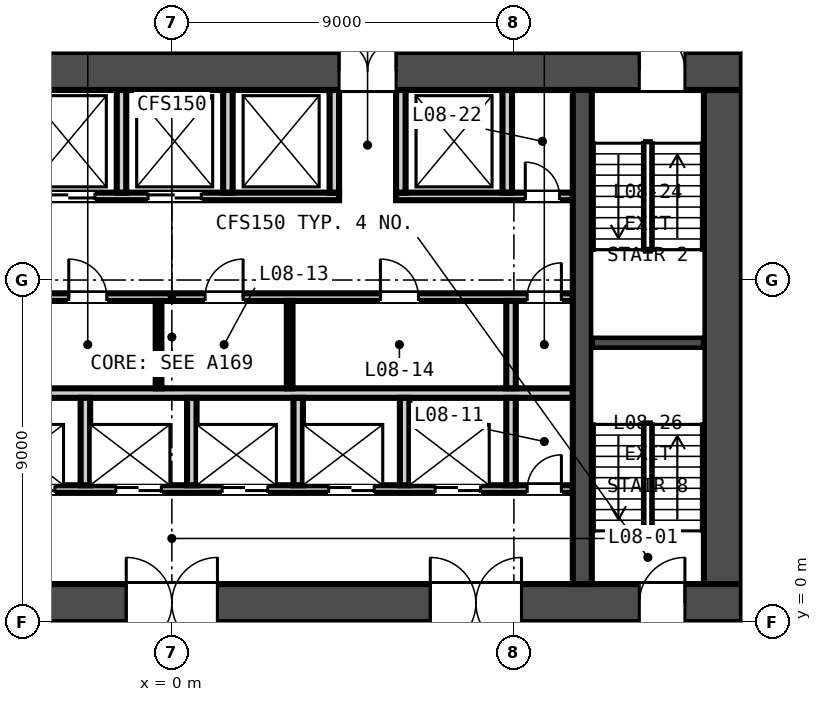
"""IFC4 building model, lengths in metres.
Left out: names, types, materials, properties, quantities, classifications, styles, units other than length and angle.
Written with IfcOpenShell. Run it as: python <this file> out.ifc"""

import sys

from ifc_helpers import new_model, si_unit, direction, frame, frame_2d, origin, place, context, subcontext, project, spatial, rectangle, extrude, element, fill, save


model = new_model("IFC4")
c1 = context("Model", 3, precision=1e-05, world=origin(), true_north=direction((0.0, 1.0)))
c2 = subcontext(c1, "Body", "Model", "MODEL_VIEW")
j1 = project(units=[si_unit("LENGTHUNIT", "METRE"), si_unit("PLANEANGLEUNIT", "RADIAN")], contexts=[c1])
p1 = place(None, origin())
s1 = spatial("IfcSite", under=j1, at=p1, CompositionType="ELEMENT")
p2 = place(p1, origin())
s2 = spatial("IfcBuilding", under=s1, at=p2, CompositionType="ELEMENT")
p3 = place(p2, frame((0.0, 0.0, 43.3)))
s3 = spatial("IfcBuildingStorey", under=s2, at=p3, CompositionType="ELEMENT", Elevation=43.3)
p4 = place(p3, frame((-15.0, 0.5, -0.15), z_axis=(0.0, 0.0, 1.0), x_axis=(1.0, 0.0, 0.0)))
e1 = element("IfcWall", 1, at=p4, inside=s3, PredefinedType="SOLIDWALL", context=c2, shape_type="SweptSolid", body=[
    extrude(rectangle(XDim=30.0, YDim=1.0, at=frame_2d((15.0, 0.0))), origin(), (0.0, 0.0, 1.0), 3.65),
])
p5 = place(p4, frame((5.8, 0.0, 0.15)))
e2 = element("IfcOpeningElement", 2, at=p5, cuts=e1, PredefinedType="OPENING", context=c2, shape_type="SweptSolid", body=[
    extrude(rectangle(XDim=2.4, YDim=2.4, at=frame_2d((1.2, 1.2))), frame((0.0, 0.51, 0.0), z_axis=(0.0, -1.0, 0.0), x_axis=(1.0, 0.0, 0.0)), (0.0, 0.0, 1.0), 1.02),
])
p6 = place(p4, frame((13.8, 0.0, 0.15)))
e3 = element("IfcOpeningElement", 3, at=p6, cuts=e1, PredefinedType="OPENING", context=c2, shape_type="SweptSolid", body=[
    extrude(rectangle(XDim=2.4, YDim=2.4, at=frame_2d((1.2, 1.2))), frame((0.0, 0.51, 0.0), z_axis=(0.0, -1.0, 0.0), x_axis=(1.0, 0.0, 0.0)), (0.0, 0.0, 1.0), 1.02),
])
p7 = place(p4, frame((21.8, 0.0, 0.15)))
e4 = element("IfcOpeningElement", 4, at=p7, cuts=e1, PredefinedType="OPENING", context=c2, shape_type="SweptSolid", body=[
    extrude(rectangle(XDim=2.4, YDim=2.4, at=frame_2d((1.2, 1.2))), frame((0.0, 0.51, 0.0), z_axis=(0.0, -1.0, 0.0), x_axis=(1.0, 0.0, 0.0)), (0.0, 0.0, 1.0), 1.02),
])
p8 = place(p4, frame((1.5, 0.0, 0.15)))
e5 = element("IfcOpeningElement", 5, at=p8, cuts=e1, PredefinedType="OPENING", context=c2, shape_type="SweptSolid", body=[
    extrude(rectangle(XDim=1.2, YDim=2.1, at=frame_2d((0.6, 1.05))), frame((0.0, 0.51, 0.0), z_axis=(0.0, -1.0, 0.0), x_axis=(1.0, 0.0, 0.0)), (0.0, 0.0, 1.0), 1.02),
])
p9 = place(p4, frame((27.3, 0.0, 0.15)))
e6 = element("IfcOpeningElement", 6, at=p9, cuts=e1, PredefinedType="OPENING", context=c2, shape_type="SweptSolid", body=[
    extrude(rectangle(XDim=1.2, YDim=2.1, at=frame_2d((0.6, 1.05))), frame((0.0, 0.51, 0.0), z_axis=(0.0, -1.0, 0.0), x_axis=(1.0, 0.0, 0.0)), (0.0, 0.0, 1.0), 1.02),
])
p10 = place(p3, frame((-15.0, 14.5, -0.15), z_axis=(0.0, 0.0, 1.0), x_axis=(1.0, 0.0, 0.0)))
e7 = element("IfcWall", 7, at=p10, inside=s3, PredefinedType="SOLIDWALL", context=c2, shape_type="SweptSolid", body=[
    extrude(rectangle(XDim=30.0, YDim=1.0, at=frame_2d((15.0, 0.0))), origin(), (0.0, 0.0, 1.0), 3.65),
])
p11 = place(p10, frame((9.25, 0.0, 0.15)))
e8 = element("IfcOpeningElement", 8, at=p11, cuts=e7, PredefinedType="OPENING", context=c2, shape_type="SweptSolid", body=[
    extrude(rectangle(XDim=1.5, YDim=2.1, at=frame_2d((0.75, 1.05))), frame((0.0, 0.51, 0.0), z_axis=(0.0, -1.0, 0.0), x_axis=(1.0, 0.0, 0.0)), (0.0, 0.0, 1.0), 1.02),
])
p12 = place(p10, frame((19.4, 0.0, 0.15)))
e9 = element("IfcOpeningElement", 9, at=p12, cuts=e7, PredefinedType="OPENING", context=c2, shape_type="SweptSolid", body=[
    extrude(rectangle(XDim=1.5, YDim=2.1, at=frame_2d((0.75, 1.05))), frame((0.0, 0.51, 0.0), z_axis=(0.0, -1.0, 0.0), x_axis=(1.0, 0.0, 0.0)), (0.0, 0.0, 1.0), 1.02),
])
p13 = place(p10, frame((1.5, 0.0, 0.15)))
e10 = element("IfcOpeningElement", 10, at=p13, cuts=e7, PredefinedType="OPENING", context=c2, shape_type="SweptSolid", body=[
    extrude(rectangle(XDim=1.2, YDim=2.1, at=frame_2d((0.6, 1.05))), frame((0.0, 0.51, 0.0), z_axis=(0.0, -1.0, 0.0), x_axis=(1.0, 0.0, 0.0)), (0.0, 0.0, 1.0), 1.02),
])
p14 = place(p10, frame((27.3, 0.0, 0.15)))
e11 = element("IfcOpeningElement", 11, at=p14, cuts=e7, PredefinedType="OPENING", context=c2, shape_type="SweptSolid", body=[
    extrude(rectangle(XDim=1.2, YDim=2.1, at=frame_2d((0.6, 1.05))), frame((0.0, 0.51, 0.0), z_axis=(0.0, -1.0, 0.0), x_axis=(1.0, 0.0, 0.0)), (0.0, 0.0, 1.0), 1.02),
])
p15 = place(p3, frame((14.5, 1.0, -0.15), z_axis=(0.0, 0.0, 1.0), x_axis=(0.0, 1.0, 0.0)))
e12 = element("IfcWall", 12, at=p15, inside=s3, PredefinedType="SOLIDWALL", context=c2, shape_type="SweptSolid", body=[
    extrude(rectangle(XDim=13.0, YDim=1.0, at=frame_2d((6.5, 0.0))), origin(), (0.0, 0.0, 1.0), 3.65),
])
p16 = place(p3, frame((10.8, 1.0, -0.15), z_axis=(0.0, 0.0, 1.0), x_axis=(0.0, 1.0, 0.0)))
e13 = element("IfcWall", 13, at=p16, inside=s3, PredefinedType="SOLIDWALL", context=c2, shape_type="SweptSolid", body=[
    extrude(rectangle(XDim=13.0, YDim=0.5, at=frame_2d((6.5, 0.0))), origin(), (0.0, 0.0, 1.0), 3.65),
])
p17 = place(p3, frame((-10.55, 3.5, 0.0), z_axis=(0.0, 0.0, 1.0), x_axis=(1.0, 0.0, 0.0)))
e14 = element("IfcWall", 14, at=p17, inside=s3, PredefinedType="PARTITIONING", context=c2, shape_type="SweptSolid", body=[
    extrude(rectangle(XDim=21.1, YDim=0.2, at=frame_2d((10.55, 0.0))), origin(), (0.0, 0.0, 1.0), 3.5),
])
p18 = place(p17, frame((0.675, 0.0, 0.0)))
e15 = element("IfcOpeningElement", 15, at=p18, cuts=e14, PredefinedType="OPENING", context=c2, shape_type="SweptSolid", body=[
    extrude(rectangle(XDim=1.2, YDim=2.1, at=frame_2d((0.6, 1.05))), frame((0.0, 0.11, 0.0), z_axis=(0.0, -1.0, 0.0), x_axis=(1.0, 0.0, 0.0)), (0.0, 0.0, 1.0), 0.22),
])
p19 = place(p17, frame((3.475, 0.0, 0.0)))
e16 = element("IfcOpeningElement", 16, at=p19, cuts=e14, PredefinedType="OPENING", context=c2, shape_type="SweptSolid", body=[
    extrude(rectangle(XDim=1.2, YDim=2.1, at=frame_2d((0.6, 1.05))), frame((0.0, 0.11, 0.0), z_axis=(0.0, -1.0, 0.0), x_axis=(1.0, 0.0, 0.0)), (0.0, 0.0, 1.0), 0.22),
])
p20 = place(p17, frame((6.275, 0.0, 0.0)))
e17 = element("IfcOpeningElement", 17, at=p20, cuts=e14, PredefinedType="OPENING", context=c2, shape_type="SweptSolid", body=[
    extrude(rectangle(XDim=1.2, YDim=2.1, at=frame_2d((0.6, 1.05))), frame((0.0, 0.11, 0.0), z_axis=(0.0, -1.0, 0.0), x_axis=(1.0, 0.0, 0.0)), (0.0, 0.0, 1.0), 0.22),
])
p21 = place(p17, frame((9.075, 0.0, 0.0)))
e18 = element("IfcOpeningElement", 18, at=p21, cuts=e14, PredefinedType="OPENING", context=c2, shape_type="SweptSolid", body=[
    extrude(rectangle(XDim=1.2, YDim=2.1, at=frame_2d((0.6, 1.05))), frame((0.0, 0.11, 0.0), z_axis=(0.0, -1.0, 0.0), x_axis=(1.0, 0.0, 0.0)), (0.0, 0.0, 1.0), 0.22),
])
p22 = place(p17, frame((11.875, 0.0, 0.0)))
e19 = element("IfcOpeningElement", 19, at=p22, cuts=e14, PredefinedType="OPENING", context=c2, shape_type="SweptSolid", body=[
    extrude(rectangle(XDim=1.2, YDim=2.1, at=frame_2d((0.6, 1.05))), frame((0.0, 0.11, 0.0), z_axis=(0.0, -1.0, 0.0), x_axis=(1.0, 0.0, 0.0)), (0.0, 0.0, 1.0), 0.22),
])
p23 = place(p17, frame((14.675, 0.0, 0.0)))
e20 = element("IfcOpeningElement", 20, at=p23, cuts=e14, PredefinedType="OPENING", context=c2, shape_type="SweptSolid", body=[
    extrude(rectangle(XDim=1.2, YDim=2.1, at=frame_2d((0.6, 1.05))), frame((0.0, 0.11, 0.0), z_axis=(0.0, -1.0, 0.0), x_axis=(1.0, 0.0, 0.0)), (0.0, 0.0, 1.0), 0.22),
])
p24 = place(p17, frame((17.475, 0.0, 0.0)))
e21 = element("IfcOpeningElement", 21, at=p24, cuts=e14, PredefinedType="OPENING", context=c2, shape_type="SweptSolid", body=[
    extrude(rectangle(XDim=1.2, YDim=2.1, at=frame_2d((0.6, 1.05))), frame((0.0, 0.11, 0.0), z_axis=(0.0, -1.0, 0.0), x_axis=(1.0, 0.0, 0.0)), (0.0, 0.0, 1.0), 0.22),
])
p25 = place(p17, frame((19.9, 0.0, 0.0)))
e22 = element("IfcOpeningElement", 22, at=p25, cuts=e14, PredefinedType="OPENING", context=c2, shape_type="SweptSolid", body=[
    extrude(rectangle(XDim=0.9, YDim=2.1, at=frame_2d((0.45, 1.05))), frame((0.0, 0.11, 0.0), z_axis=(0.0, -1.0, 0.0), x_axis=(1.0, 0.0, 0.0)), (0.0, 0.0, 1.0), 0.22),
])
p26 = place(p3, frame((-10.55, 6.025, 0.0), z_axis=(0.0, 0.0, 1.0), x_axis=(1.0, 0.0, 0.0)))
e23 = element("IfcWall", 23, at=p26, inside=s3, PredefinedType="PARTITIONING", context=c2, shape_type="SweptSolid", body=[
    extrude(rectangle(XDim=21.1, YDim=0.25, at=frame_2d((10.55, 0.0))), origin(), (0.0, 0.0, 1.0), 3.5),
])
p27 = place(p3, frame((-4.125, 8.55, 0.0), z_axis=(0.0, 0.0, 1.0), x_axis=(1.0, 0.0, 0.0)))
e24 = element("IfcWall", 24, at=p27, inside=s3, PredefinedType="PARTITIONING", context=c2, shape_type="SweptSolid", body=[
    extrude(rectangle(XDim=14.675, YDim=0.2, at=frame_2d((7.337, 0.0))), origin(), (0.0, 0.0, 1.0), 3.5),
])
p28 = place(p27, frame((1.413, 0.0, 0.0)))
e25 = element("IfcOpeningElement", 25, at=p28, cuts=e24, PredefinedType="OPENING", context=c2, shape_type="SweptSolid", body=[
    extrude(rectangle(XDim=1.0, YDim=2.1, at=frame_2d((0.5, 1.05))), frame((0.0, 0.11, 0.0), z_axis=(0.0, -1.0, 0.0), x_axis=(1.0, 0.0, 0.0)), (0.0, 0.0, 1.0), 0.22),
])
p29 = place(p27, frame((5.0, 0.0, 0.0)))
e26 = element("IfcOpeningElement", 26, at=p29, cuts=e24, PredefinedType="OPENING", context=c2, shape_type="SweptSolid", body=[
    extrude(rectangle(XDim=1.0, YDim=2.1, at=frame_2d((0.5, 1.05))), frame((0.0, 0.11, 0.0), z_axis=(0.0, -1.0, 0.0), x_axis=(1.0, 0.0, 0.0)), (0.0, 0.0, 1.0), 0.22),
])
p30 = place(p27, frame((9.613, 0.0, 0.0)))
e27 = element("IfcOpeningElement", 27, at=p30, cuts=e24, PredefinedType="OPENING", context=c2, shape_type="SweptSolid", body=[
    extrude(rectangle(XDim=1.0, YDim=2.1, at=frame_2d((0.5, 1.05))), frame((0.0, 0.11, 0.0), z_axis=(0.0, -1.0, 0.0), x_axis=(1.0, 0.0, 0.0)), (0.0, 0.0, 1.0), 0.22),
])
p31 = place(p27, frame((13.475, 0.0, 0.0)))
e28 = element("IfcOpeningElement", 28, at=p31, cuts=e24, PredefinedType="OPENING", context=c2, shape_type="SweptSolid", body=[
    extrude(rectangle(XDim=0.9, YDim=2.1, at=frame_2d((0.45, 1.05))), frame((0.0, 0.11, 0.0), z_axis=(0.0, -1.0, 0.0), x_axis=(1.0, 0.0, 0.0)), (0.0, 0.0, 1.0), 0.22),
])
p32 = place(p3, frame((-4.25, 11.2, 0.0), z_axis=(0.0, 0.0, 1.0), x_axis=(1.0, 0.0, 0.0)))
e29 = element("IfcWall", 29, at=p32, inside=s3, PredefinedType="PARTITIONING", context=c2, shape_type="SweptSolid", body=[
    extrude(rectangle(XDim=8.65, YDim=0.2, at=frame_2d((4.325, 0.0))), origin(), (0.0, 0.0, 1.0), 3.5),
])
p33 = place(p32, frame((0.825, 0.0, 0.0)))
e30 = element("IfcOpeningElement", 30, at=p33, cuts=e29, PredefinedType="OPENING", context=c2, shape_type="SweptSolid", body=[
    extrude(rectangle(XDim=1.4, YDim=2.1, at=frame_2d((0.7, 1.05))), frame((0.0, 0.11, 0.0), z_axis=(0.0, -1.0, 0.0), x_axis=(1.0, 0.0, 0.0)), (0.0, 0.0, 1.0), 0.22),
])
p34 = place(p32, frame((3.625, 0.0, 0.0)))
e31 = element("IfcOpeningElement", 31, at=p34, cuts=e29, PredefinedType="OPENING", context=c2, shape_type="SweptSolid", body=[
    extrude(rectangle(XDim=1.4, YDim=2.1, at=frame_2d((0.7, 1.05))), frame((0.0, 0.11, 0.0), z_axis=(0.0, -1.0, 0.0), x_axis=(1.0, 0.0, 0.0)), (0.0, 0.0, 1.0), 0.22),
])
p35 = place(p3, frame((5.9, 11.2, 0.0), z_axis=(0.0, 0.0, 1.0), x_axis=(1.0, 0.0, 0.0)))
e32 = element("IfcWall", 32, at=p35, inside=s3, PredefinedType="PARTITIONING", context=c2, shape_type="SweptSolid", body=[
    extrude(rectangle(XDim=4.65, YDim=0.2, at=frame_2d((2.325, 0.0))), origin(), (0.0, 0.0, 1.0), 3.5),
])
p36 = place(p35, frame((3.4, 0.0, 0.0)))
e33 = element("IfcOpeningElement", 33, at=p36, cuts=e32, PredefinedType="OPENING", context=c2, shape_type="SweptSolid", body=[
    extrude(rectangle(XDim=0.9, YDim=2.1, at=frame_2d((0.45, 1.05))), frame((0.0, 0.11, 0.0), z_axis=(0.0, -1.0, 0.0), x_axis=(1.0, 0.0, 0.0)), (0.0, 0.0, 1.0), 0.22),
])
for number, where, z_axis, x_axis in (
    (34, (-2.275, 3.6, 0.0), (0.0, 0.0, 1.0), (0.0, 1.0, 0.0)),
    (35, (0.525, 3.6, 0.0), (0.0, 0.0, 1.0), (0.0, 1.0, 0.0)),
    (36, (3.325, 3.6, 0.0), (0.0, 0.0, 1.0), (0.0, 1.0, 0.0)),
    (37, (6.125, 3.6, 0.0), (0.0, 0.0, 1.0), (0.0, 1.0, 0.0)),
    (38, (8.925, 3.6, 0.0), (0.0, 0.0, 1.0), (0.0, 1.0, 0.0)),
):
    element("IfcWall", number, at=place(p3, frame(where, z_axis=z_axis, x_axis=x_axis)), inside=s3, PredefinedType="PARTITIONING", context=c2, shape_type="SweptSolid", body=[
        extrude(rectangle(XDim=2.3, YDim=0.25, at=frame_2d((1.15, 0.0))), origin(), (0.0, 0.0, 1.0), 3.5),
    ])
for number, where, z_axis, x_axis in (
    (39, (-0.35, 6.15, 0.0), (0.0, 0.0, 1.0), (0.0, 1.0, 0.0)),
    (40, (3.1, 6.15, 0.0), (0.0, 0.0, 1.0), (0.0, 1.0, 0.0)),
):
    element("IfcWall", number, at=place(p3, frame(where, z_axis=z_axis, x_axis=x_axis)), inside=s3, PredefinedType="PARTITIONING", context=c2, shape_type="SweptSolid", body=[
        extrude(rectangle(XDim=2.3, YDim=0.15, at=frame_2d((1.15, 0.0))), origin(), (0.0, 0.0, 1.0), 3.5),
    ])
p37 = place(p3, frame((8.925, 6.15, 0.0), z_axis=(0.0, 0.0, 1.0), x_axis=(0.0, 1.0, 0.0)))
e41 = element("IfcWall", 41, at=p37, inside=s3, PredefinedType="PARTITIONING", context=c2, shape_type="SweptSolid", body=[
    extrude(rectangle(XDim=2.3, YDim=0.25, at=frame_2d((1.15, 0.0))), origin(), (0.0, 0.0, 1.0), 3.5),
])
for number, where, z_axis, x_axis in (
    (42, (-1.325, 11.3, 0.0), (0.0, 0.0, 1.0), (0.0, 1.0, 0.0)),
    (43, (1.475, 11.3, 0.0), (0.0, 0.0, 1.0), (0.0, 1.0, 0.0)),
    (44, (4.275, 11.3, 0.0), (0.0, 0.0, 1.0), (0.0, 1.0, 0.0)),
    (45, (6.025, 11.3, 0.0), (0.0, 0.0, 1.0), (0.0, 1.0, 0.0)),
    (46, (8.825, 11.3, 0.0), (0.0, 0.0, 1.0), (0.0, 1.0, 0.0)),
):
    element("IfcWall", number, at=place(p3, frame(where, z_axis=z_axis, x_axis=x_axis)), inside=s3, PredefinedType="PARTITIONING", context=c2, shape_type="SweptSolid", body=[
        extrude(rectangle(XDim=2.7, YDim=0.25, at=frame_2d((1.35, 0.0))), origin(), (0.0, 0.0, 1.0), 3.5),
    ])
p38 = place(p3, frame((11.05, 7.35, -0.15), z_axis=(0.0, 0.0, 1.0), x_axis=(1.0, 0.0, 0.0)))
e47 = element("IfcWall", 47, at=p38, inside=s3, PredefinedType="SOLIDWALL", context=c2, shape_type="SweptSolid", body=[
    extrude(rectangle(XDim=2.95, YDim=0.3, at=frame_2d((1.475, 0.0))), origin(), (0.0, 0.0, 1.0), 3.65),
])
p39 = place(p3, frame((15.0, 10.517, 0.0), z_axis=(0.0, 0.0, 1.0), x_axis=(1.0, 0.0, 0.0)))
e48 = element("IfcWall", 48, at=p39, inside=s3, PredefinedType="PARTITIONING", context=c2, shape_type="SweptSolid", body=[
    extrude(rectangle(XDim=16.842, YDim=0.25, at=frame_2d((8.421, 0.0))), origin(), (0.0, 0.0, 1.0), 2.741),
])
p40 = place(p39, frame((7.921, 0.0, 0.0)))
e49 = element("IfcOpeningElement", 49, at=p40, cuts=e48, PredefinedType="OPENING", context=c2, shape_type="SweptSolid", body=[
    extrude(rectangle(XDim=1.0, YDim=2.1, at=frame_2d((0.5, 1.05))), frame((0.0, 0.135, 0.0), z_axis=(0.0, -1.0, 0.0), x_axis=(1.0, 0.0, 0.0)), (0.0, 0.0, 1.0), 0.27),
])
p41 = place(p20, origin())
e50 = element("IfcDoor", 50, at=p41, inside=s3, OperationType="DOUBLE_DOOR_SLIDING", PredefinedType="DOOR", context=c2, shape_type="SweptSolid", body=[
    extrude(rectangle(XDim=1.2, YDim=2.1, at=frame_2d((0.6, 1.05))), frame((0.0, 0.025, 0.0), z_axis=(0.0, -1.0, 0.0), x_axis=(1.0, 0.0, 0.0)), (0.0, 0.0, 1.0), 0.05),
])
fill(e17, e50)
p42 = place(p21, origin())
e51 = element("IfcDoor", 51, at=p42, inside=s3, OperationType="DOUBLE_DOOR_SLIDING", PredefinedType="DOOR", context=c2, shape_type="SweptSolid", body=[
    extrude(rectangle(XDim=1.2, YDim=2.1, at=frame_2d((0.6, 1.05))), frame((0.0, 0.025, 0.0), z_axis=(0.0, -1.0, 0.0), x_axis=(1.0, 0.0, 0.0)), (0.0, 0.0, 1.0), 0.05),
])
fill(e18, e51)
p43 = place(p22, origin())
e52 = element("IfcDoor", 52, at=p43, inside=s3, OperationType="DOUBLE_DOOR_SLIDING", PredefinedType="DOOR", context=c2, shape_type="SweptSolid", body=[
    extrude(rectangle(XDim=1.2, YDim=2.1, at=frame_2d((0.6, 1.05))), frame((0.0, 0.025, 0.0), z_axis=(0.0, -1.0, 0.0), x_axis=(1.0, 0.0, 0.0)), (0.0, 0.0, 1.0), 0.05),
])
fill(e19, e52)
p44 = place(p23, origin())
e53 = element("IfcDoor", 53, at=p44, inside=s3, OperationType="DOUBLE_DOOR_SLIDING", PredefinedType="DOOR", context=c2, shape_type="SweptSolid", body=[
    extrude(rectangle(XDim=1.2, YDim=2.1, at=frame_2d((0.6, 1.05))), frame((0.0, 0.025, 0.0), z_axis=(0.0, -1.0, 0.0), x_axis=(1.0, 0.0, 0.0)), (0.0, 0.0, 1.0), 0.05),
])
fill(e20, e53)
p45 = place(p24, origin())
e54 = element("IfcDoor", 54, at=p45, inside=s3, OperationType="DOUBLE_DOOR_SLIDING", PredefinedType="DOOR", context=c2, shape_type="SweptSolid", body=[
    extrude(rectangle(XDim=1.2, YDim=2.1, at=frame_2d((0.6, 1.05))), frame((0.0, 0.025, 0.0), z_axis=(0.0, -1.0, 0.0), x_axis=(1.0, 0.0, 0.0)), (0.0, 0.0, 1.0), 0.05),
])
fill(e21, e54)
p46 = place(p25, origin())
e55 = element("IfcDoor", 55, at=p46, inside=s3, OperationType="SINGLE_SWING_RIGHT", PredefinedType="DOOR", context=c2, shape_type="SweptSolid", body=[
    extrude(rectangle(XDim=0.9, YDim=2.1, at=frame_2d((0.45, 1.05))), frame((0.0, 0.025, 0.0), z_axis=(0.0, -1.0, 0.0), x_axis=(1.0, 0.0, 0.0)), (0.0, 0.0, 1.0), 0.05),
])
fill(e22, e55)
p47 = place(p28, origin())
e56 = element("IfcDoor", 56, at=p47, inside=s3, OperationType="SINGLE_SWING_LEFT", PredefinedType="DOOR", context=c2, shape_type="SweptSolid", body=[
    extrude(rectangle(XDim=1.0, YDim=2.1, at=frame_2d((0.5, 1.05))), frame((0.0, 0.025, 0.0), z_axis=(0.0, -1.0, 0.0), x_axis=(1.0, 0.0, 0.0)), (0.0, 0.0, 1.0), 0.05),
])
fill(e25, e56)
p48 = place(p29, origin())
e57 = element("IfcDoor", 57, at=p48, inside=s3, OperationType="SINGLE_SWING_RIGHT", PredefinedType="DOOR", context=c2, shape_type="SweptSolid", body=[
    extrude(rectangle(XDim=1.0, YDim=2.1, at=frame_2d((0.5, 1.05))), frame((0.0, 0.025, 0.0), z_axis=(0.0, -1.0, 0.0), x_axis=(1.0, 0.0, 0.0)), (0.0, 0.0, 1.0), 0.05),
])
fill(e26, e57)
p49 = place(p30, origin())
e58 = element("IfcDoor", 58, at=p49, inside=s3, OperationType="SINGLE_SWING_LEFT", PredefinedType="DOOR", context=c2, shape_type="SweptSolid", body=[
    extrude(rectangle(XDim=1.0, YDim=2.1, at=frame_2d((0.5, 1.05))), frame((0.0, 0.025, 0.0), z_axis=(0.0, -1.0, 0.0), x_axis=(1.0, 0.0, 0.0)), (0.0, 0.0, 1.0), 0.05),
])
fill(e27, e58)
p50 = place(p31, origin())
e59 = element("IfcDoor", 59, at=p50, inside=s3, OperationType="SINGLE_SWING_RIGHT", PredefinedType="DOOR", context=c2, shape_type="SweptSolid", body=[
    extrude(rectangle(XDim=0.9, YDim=2.1, at=frame_2d((0.45, 1.05))), frame((0.0, 0.025, 0.0), z_axis=(0.0, -1.0, 0.0), x_axis=(1.0, 0.0, 0.0)), (0.0, 0.0, 1.0), 0.05),
])
fill(e28, e59)
p51 = place(p33, origin())
e60 = element("IfcDoor", 60, at=p51, inside=s3, OperationType="DOUBLE_DOOR_SLIDING", PredefinedType="DOOR", context=c2, shape_type="SweptSolid", body=[
    extrude(rectangle(XDim=1.4, YDim=2.1, at=frame_2d((0.7, 1.05))), frame((0.0, 0.025, 0.0), z_axis=(0.0, -1.0, 0.0), x_axis=(1.0, 0.0, 0.0)), (0.0, 0.0, 1.0), 0.05),
])
fill(e30, e60)
p52 = place(p34, origin())
e61 = element("IfcDoor", 61, at=p52, inside=s3, OperationType="DOUBLE_DOOR_SLIDING", PredefinedType="DOOR", context=c2, shape_type="SweptSolid", body=[
    extrude(rectangle(XDim=1.4, YDim=2.1, at=frame_2d((0.7, 1.05))), frame((0.0, 0.025, 0.0), z_axis=(0.0, -1.0, 0.0), x_axis=(1.0, 0.0, 0.0)), (0.0, 0.0, 1.0), 0.05),
])
fill(e31, e61)
p53 = place(p36, origin())
e62 = element("IfcDoor", 62, at=p53, inside=s3, OperationType="SINGLE_SWING_LEFT", PredefinedType="DOOR", context=c2, shape_type="SweptSolid", body=[
    extrude(rectangle(XDim=0.9, YDim=2.1, at=frame_2d((0.45, 1.05))), frame((0.0, 0.025, 0.0), z_axis=(0.0, -1.0, 0.0), x_axis=(1.0, 0.0, 0.0)), (0.0, 0.0, 1.0), 0.05),
])
fill(e33, e62)
p54 = place(p6, origin())
e63 = element("IfcDoor", 63, at=p54, inside=s3, OperationType="DOUBLE_DOOR_DOUBLE_SWING", PredefinedType="DOOR", context=c2, shape_type="SweptSolid", body=[
    extrude(rectangle(XDim=2.4, YDim=2.4, at=frame_2d((1.2, 1.2))), frame((0.0, 0.025, 0.0), z_axis=(0.0, -1.0, 0.0), x_axis=(1.0, 0.0, 0.0)), (0.0, 0.0, 1.0), 0.05),
])
fill(e3, e63)
p55 = place(p7, origin())
e64 = element("IfcDoor", 64, at=p55, inside=s3, OperationType="DOUBLE_DOOR_DOUBLE_SWING", PredefinedType="DOOR", context=c2, shape_type="SweptSolid", body=[
    extrude(rectangle(XDim=2.4, YDim=2.4, at=frame_2d((1.2, 1.2))), frame((0.0, 0.025, 0.0), z_axis=(0.0, -1.0, 0.0), x_axis=(1.0, 0.0, 0.0)), (0.0, 0.0, 1.0), 0.05),
])
fill(e4, e64)
p56 = place(p12, origin())
e65 = element("IfcDoor", 65, at=p56, inside=s3, OperationType="DOUBLE_DOOR_SINGLE_SWING", PredefinedType="DOOR", context=c2, shape_type="SweptSolid", body=[
    extrude(rectangle(XDim=1.5, YDim=2.1, at=frame_2d((0.75, 1.05))), frame((0.0, 0.025, 0.0), z_axis=(0.0, -1.0, 0.0), x_axis=(1.0, 0.0, 0.0)), (0.0, 0.0, 1.0), 0.05),
])
fill(e9, e65)
p57 = place(p14, origin())
e66 = element("IfcDoor", 66, at=p57, inside=s3, OperationType="SINGLE_SWING_LEFT", PredefinedType="DOOR", context=c2, shape_type="SweptSolid", body=[
    extrude(rectangle(XDim=1.2, YDim=2.1, at=frame_2d((0.6, 1.05))), frame((0.0, 0.025, 0.0), z_axis=(0.0, -1.0, 0.0), x_axis=(1.0, 0.0, 0.0)), (0.0, 0.0, 1.0), 0.05),
])
fill(e11, e66)
p58 = place(p9, origin())
e67 = element("IfcDoor", 67, at=p58, inside=s3, OperationType="SINGLE_SWING_RIGHT", PredefinedType="DOOR", context=c2, shape_type="SweptSolid", body=[
    extrude(rectangle(XDim=1.2, YDim=2.1, at=frame_2d((0.6, 1.05))), frame((0.0, 0.025, 0.0), z_axis=(0.0, -1.0, 0.0), x_axis=(1.0, 0.0, 0.0)), (0.0, 0.0, 1.0), 0.05),
])
fill(e6, e67)
save(model, sys.argv[1])
